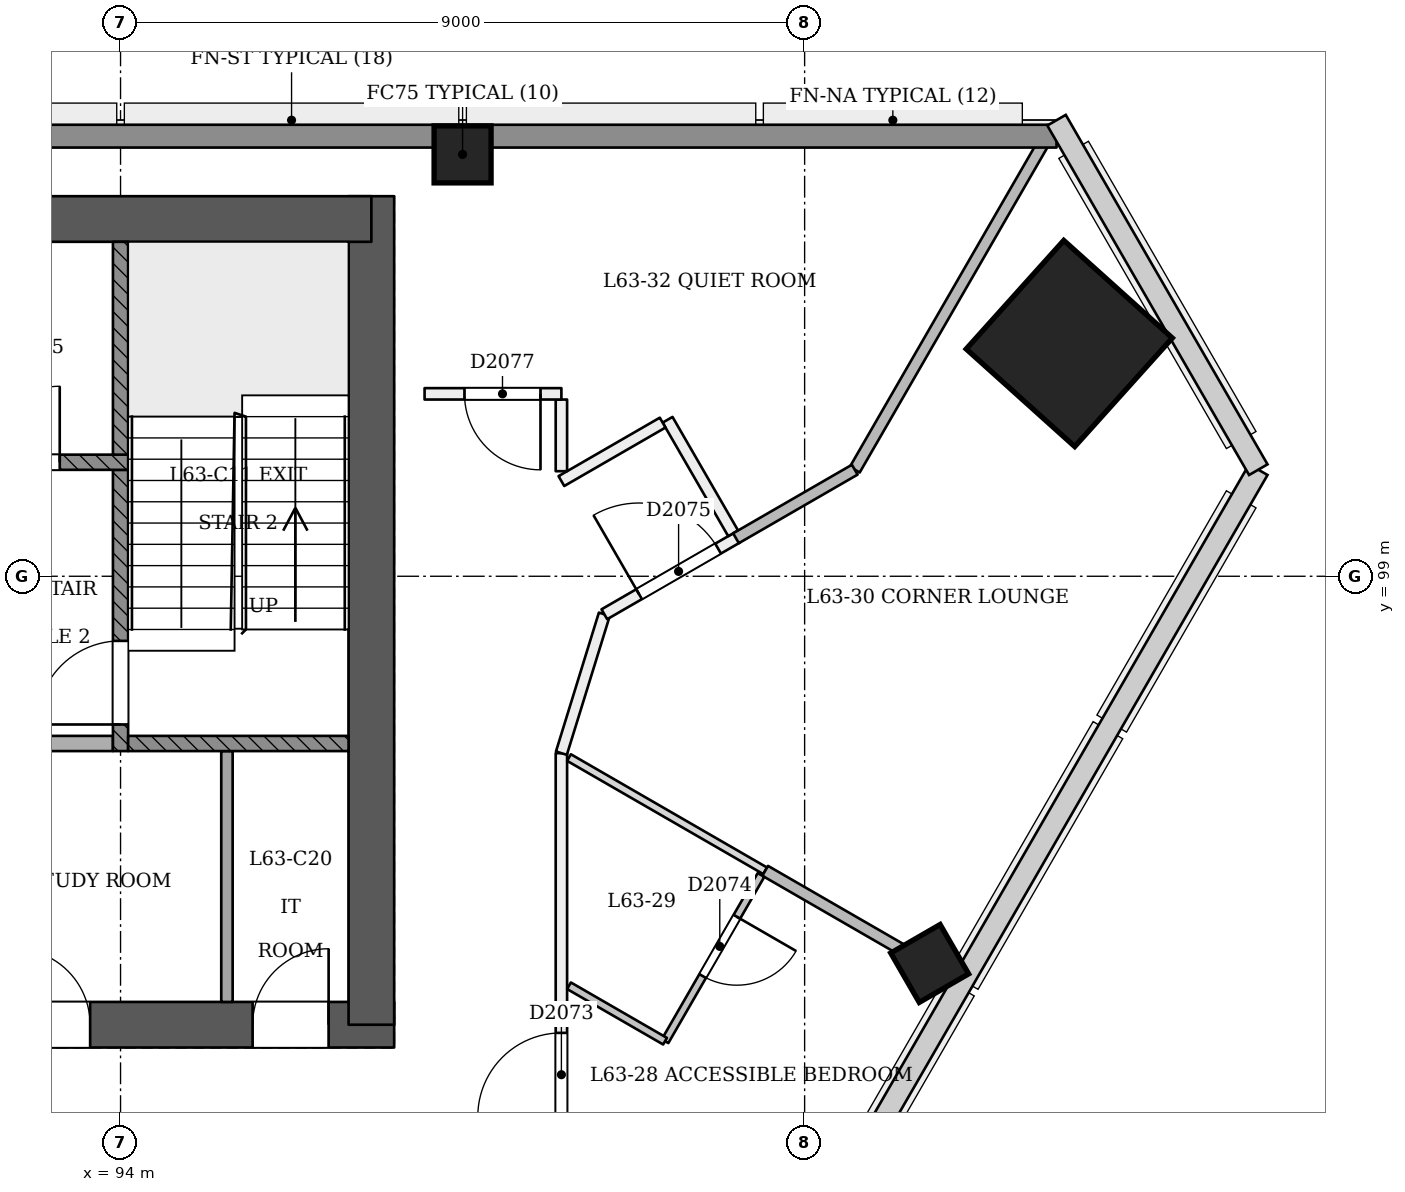
"""IFC4 building model, lengths in metres.
Left out: names, types, materials, properties, quantities, classifications, styles, units other than length and angle.
Written with IfcOpenShell. Run it as: python <this file> out.ifc"""

import sys

from ifc_helpers import new_model, si_unit, direction, frame, frame_2d, origin, origin_2d, place, context, subcontext, project, spatial, rectangle, extrude, element, fill, save


model = new_model("IFC4")
c1 = context("Model", 3, precision=1e-05, world=origin(), true_north=direction((0.0, 1.0)))
c2 = subcontext(c1, "Body", "Model", "MODEL_VIEW")
j1 = project(units=[si_unit("LENGTHUNIT", "METRE"), si_unit("PLANEANGLEUNIT", "RADIAN")], contexts=[c1])
p1 = place(None, origin())
s1 = spatial("IfcSite", under=j1, at=p1, CompositionType="ELEMENT")
p2 = place(p1, origin())
s2 = spatial("IfcBuilding", under=s1, at=p2, CompositionType="ELEMENT")
p3 = place(p2, frame((0.0, 0.0, 246.4)))
s3 = spatial("IfcBuildingStorey", under=s2, at=p3, CompositionType="ELEMENT", Elevation=246.4)
p4 = place(p3, frame((72.7, 93.1, 0.0), z_axis=(0.0, 0.0, 1.0), x_axis=(1.0, 0.0, 0.0)))
e1 = element("IfcWall", 1, at=p4, inside=s3, PredefinedType="SHEAR", context=c2, shape_type="SweptSolid", body=[
    extrude(rectangle(XDim=24.9, YDim=0.6, at=frame_2d((12.45, 0.0))), origin(), (0.0, 0.0, 1.0), 3.6),
])
p5 = place(p4, frame((1.1, 0.0, 0.0)))
e2 = element("IfcOpeningElement", 2, at=p5, cuts=e1, PredefinedType="OPENING", context=c2, shape_type="SweptSolid", body=[
    extrude(rectangle(XDim=1.2, YDim=2.1, at=frame_2d((0.6, 1.05))), frame((0.0, 0.311, 0.0), z_axis=(0.0, -1.0, 0.0), x_axis=(1.0, 0.0, 0.0)), (0.0, 0.0, 1.0), 0.621),
])
p6 = place(p4, frame((3.3, 0.0, 0.0)))
e3 = element("IfcOpeningElement", 3, at=p6, cuts=e1, PredefinedType="OPENING", context=c2, shape_type="SweptSolid", body=[
    extrude(rectangle(XDim=1.2, YDim=2.1, at=frame_2d((0.6, 1.05))), frame((0.0, 0.311, 0.0), z_axis=(0.0, -1.0, 0.0), x_axis=(1.0, 0.0, 0.0)), (0.0, 0.0, 1.0), 0.621),
])
p7 = place(p4, frame((13.3, 0.0, 0.0)))
e4 = element("IfcOpeningElement", 4, at=p7, cuts=e1, PredefinedType="OPENING", context=c2, shape_type="SweptSolid", body=[
    extrude(rectangle(XDim=1.2, YDim=2.1, at=frame_2d((0.6, 1.05))), frame((0.0, 0.311, 0.0), z_axis=(0.0, -1.0, 0.0), x_axis=(1.0, 0.0, 0.0)), (0.0, 0.0, 1.0), 0.621),
])
p8 = place(p4, frame((16.012, 0.0, 0.0)))
e5 = element("IfcOpeningElement", 5, at=p8, cuts=e1, PredefinedType="OPENING", context=c2, shape_type="SweptSolid", body=[
    extrude(rectangle(XDim=1.0, YDim=2.1, at=frame_2d((0.5, 1.05))), frame((0.0, 0.311, 0.0), z_axis=(0.0, -1.0, 0.0), x_axis=(1.0, 0.0, 0.0)), (0.0, 0.0, 1.0), 0.621),
])
p9 = place(p4, frame((19.9, 0.0, 0.0)))
e6 = element("IfcOpeningElement", 6, at=p9, cuts=e1, PredefinedType="OPENING", context=c2, shape_type="SweptSolid", body=[
    extrude(rectangle(XDim=1.0, YDim=2.1, at=frame_2d((0.5, 1.05))), frame((0.0, 0.311, 0.0), z_axis=(0.0, -1.0, 0.0), x_axis=(1.0, 0.0, 0.0)), (0.0, 0.0, 1.0), 0.621),
])
p10 = place(p4, frame((23.038, 0.0, 0.0)))
e7 = element("IfcOpeningElement", 7, at=p10, cuts=e1, PredefinedType="OPENING", context=c2, shape_type="SweptSolid", body=[
    extrude(rectangle(XDim=1.0, YDim=2.1, at=frame_2d((0.5, 1.05))), frame((0.0, 0.311, 0.0), z_axis=(0.0, -1.0, 0.0), x_axis=(1.0, 0.0, 0.0)), (0.0, 0.0, 1.0), 0.621),
])
p11 = place(p3, frame((97.3, 93.1, 0.0), z_axis=(0.0, 0.0, 1.0), x_axis=(0.0, 1.0, 0.0)))
e8 = element("IfcWall", 8, at=p11, inside=s3, PredefinedType="SHEAR", context=c2, shape_type="SweptSolid", body=[
    extrude(rectangle(XDim=10.9, YDim=0.6, at=frame_2d((5.45, 0.0))), origin(), (0.0, 0.0, 1.0), 3.6),
])
p12 = place(p3, frame((97.3, 103.7, 0.0), z_axis=(0.0, 0.0, 1.0), x_axis=(-1.0, 0.0, 0.0)))
e9 = element("IfcWall", 9, at=p12, inside=s3, PredefinedType="SHEAR", context=c2, shape_type="SweptSolid", body=[
    extrude(rectangle(XDim=24.9, YDim=0.6, at=frame_2d((12.45, 0.0))), origin(), (0.0, 0.0, 1.0), 3.6),
])
p13 = place(p3, frame((106.516, 102.051, 0.0), z_axis=(-0.028401796786, 0.009286506348, 0.999553449666), x_axis=(0.498888848076, -0.866380961443, 0.022224916524)))
e10 = element("IfcColumn", 10, at=p13, inside=s3, PredefinedType="COLUMN", context=c2, shape_type="SweptSolid", body=[
    extrude(rectangle(XDim=1.92, YDim=1.92, at=origin_2d()), origin(), (0.0, 0.0, 1.0), 3.602),
])
p14 = place(p3, frame((98.5, 104.55, 0.0), z_axis=(0.0, 0.0, 1.0), x_axis=(1.0, 0.0, 0.0)))
e11 = element("IfcColumn", 11, at=p14, inside=s3, PredefinedType="COLUMN", context=c2, shape_type="SweptSolid", body=[
    extrude(rectangle(XDim=0.75, YDim=0.75, at=origin_2d()), origin(), (0.0, 0.0, 1.0), 3.6),
])
p15 = place(p3, frame((104.672, 93.859, -0.023), z_axis=(-0.02215369191, 0.038413282303, 0.999016333038), x_axis=(-0.500654738192, -0.865363068433, 0.022171894779)))
e12 = element("IfcColumn", 12, at=p15, inside=s3, PredefinedType="COLUMN", context=c2, shape_type="SweptSolid", body=[
    extrude(rectangle(XDim=0.75, YDim=0.75, at=origin_2d()), origin(), (0.0, 0.0, 1.0), 3.604),
])
p16 = place(p3, frame((99.8, 91.477, 0.0), z_axis=(0.0, 0.0, 1.0), x_axis=(0.0, 1.0, 0.0)))
e13 = element("IfcWall", 13, at=p16, inside=s3, PredefinedType="PARTITIONING", context=c2, shape_type="SweptSolid", body=[
    extrude(rectangle(XDim=5.196, YDim=0.15, at=frame_2d((2.598, 0.0))), origin(), (0.0, 0.0, 1.0), 3.2),
])
p17 = place(p16, frame((0.416, 0.0, 0.0)))
e14 = element("IfcOpeningElement", 14, at=p17, cuts=e13, PredefinedType="OPENING", context=c2, shape_type="SweptSolid", body=[
    extrude(rectangle(XDim=1.1, YDim=2.1, at=frame_2d((0.55, 1.05))), frame((0.0, 0.085, 0.0), z_axis=(0.0, -1.0, 0.0), x_axis=(1.0, 0.0, 0.0)), (0.0, 0.0, 1.0), 0.171),
])
p18 = place(p3, frame((99.8, 96.673, 0.0), z_axis=(0.0, 0.0, 1.0), x_axis=(0.29539525105, 0.955375133472, 0.0)))
e15 = element("IfcWall", 15, at=p18, inside=s3, PredefinedType="PARTITIONING", context=c2, shape_type="SweptSolid", body=[
    extrude(rectangle(XDim=1.913, YDim=0.15, at=frame_2d((0.956, 0.0))), origin(), (0.0, 0.0, 1.0), 3.2),
])
p19 = place(p3, frame((100.365, 98.5, 0.0), z_axis=(0.0, 0.0, 1.0), x_axis=(0.866010470582, 0.500025864173, 0.0)))
e16 = element("IfcWall", 16, at=p19, inside=s3, PredefinedType="PARTITIONING", context=c2, shape_type="SweptSolid", body=[
    extrude(rectangle(XDim=2.02, YDim=0.15, at=frame_2d((1.01, 0.0))), origin(), (0.0, 0.0, 1.0), 3.2),
])
p20 = place(p19, frame((0.528, 0.0, 0.0)))
e17 = element("IfcOpeningElement", 17, at=p20, cuts=e16, PredefinedType="OPENING", context=c2, shape_type="SweptSolid", body=[
    extrude(rectangle(XDim=1.2, YDim=2.1, at=frame_2d((0.6, 1.05))), frame((0.0, 0.085, 0.0), z_axis=(0.0, -1.0, 0.0), x_axis=(1.0, 0.0, 0.0)), (0.0, 0.0, 1.0), 0.171),
])
p21 = place(p3, frame((102.059, 99.565, 0.0), z_axis=(0.0, 0.0, 1.0), x_axis=(-0.499914405916, 0.866074815912, 0.0)))
e18 = element("IfcWall", 18, at=p21, inside=s3, PredefinedType="PARTITIONING", context=c2, shape_type="SweptSolid", body=[
    extrude(rectangle(XDim=1.725, YDim=0.15, at=frame_2d((0.862, 0.0))), origin(), (0.0, 0.0, 1.0), 3.2),
])
p22 = place(p3, frame((101.132, 101.021, 0.0), z_axis=(0.0, 0.0, 1.0), x_axis=(-0.866026989333, -0.499997253739, 0.0)))
e19 = element("IfcWall", 19, at=p22, inside=s3, PredefinedType="PARTITIONING", context=c2, shape_type="SweptSolid", body=[
    extrude(rectangle(XDim=1.538, YDim=0.15, at=frame_2d((0.769, 0.0))), origin(), (0.0, 0.0, 1.0), 3.2),
])
p23 = place(p3, frame((99.8, 100.382, 0.0), z_axis=(0.0, 0.0, 1.0), x_axis=(0.0, 1.0, 0.0)))
e20 = element("IfcWall", 20, at=p23, inside=s3, PredefinedType="PARTITIONING", context=c2, shape_type="SweptSolid", body=[
    extrude(rectangle(XDim=0.943, YDim=0.15, at=frame_2d((0.471, 0.0))), origin(), (0.0, 0.0, 1.0), 3.2),
])
p24 = place(p3, frame((99.8, 101.4, 0.0), z_axis=(0.0, 0.0, 1.0), x_axis=(-1.0, 0.0, 0.0)))
e21 = element("IfcWall", 21, at=p24, inside=s3, PredefinedType="PARTITIONING", context=c2, shape_type="SweptSolid", body=[
    extrude(rectangle(XDim=1.8, YDim=0.15, at=frame_2d((0.9, 0.0))), origin(), (0.0, 0.0, 1.0), 3.2),
])
p25 = place(p24, frame((0.275, 0.0, 0.0)))
e22 = element("IfcOpeningElement", 22, at=p25, cuts=e21, PredefinedType="OPENING", context=c2, shape_type="SweptSolid", body=[
    extrude(rectangle(XDim=1.0, YDim=2.1, at=frame_2d((0.5, 1.05))), frame((0.0, 0.085, 0.0), z_axis=(0.0, -1.0, 0.0), x_axis=(1.0, 0.0, 0.0)), (0.0, 0.0, 1.0), 0.171),
])
p26 = place(p3, frame((102.426, 95.07, 0.0), z_axis=(0.0, 0.0, 1.0), x_axis=(-0.499976333282, -0.866039067339, 0.0)))
e23 = element("IfcWall", 23, at=p26, inside=s3, PredefinedType="PARTITIONING", context=c2, shape_type="SweptSolid", body=[
    extrude(rectangle(XDim=2.525, YDim=0.1, at=frame_2d((1.262, 0.0))), origin(), (0.0, 0.0, 1.0), 3.2),
])
p27 = place(p26, frame((0.635, 0.0, 0.0)))
e24 = element("IfcOpeningElement", 24, at=p27, cuts=e23, PredefinedType="OPENING", context=c2, shape_type="SweptSolid", body=[
    extrude(rectangle(XDim=0.9, YDim=2.1, at=frame_2d((0.45, 1.05))), frame((0.0, 0.061, 0.0), z_axis=(0.0, -1.0, 0.0), x_axis=(1.0, 0.0, 0.0)), (0.0, 0.0, 1.0), 0.121),
])
p28 = place(p3, frame((101.164, 92.883, 0.0), z_axis=(0.0, 0.0, 1.0), x_axis=(-0.866051847062, 0.499954196102, 0.0)))
e25 = element("IfcWall", 25, at=p28, inside=s3, PredefinedType="PARTITIONING", context=c2, shape_type="SweptSolid", body=[
    extrude(rectangle(XDim=1.459, YDim=0.1, at=frame_2d((0.729, 0.0))), origin(), (0.0, 0.0, 1.0), 3.2),
])
p29 = place(p3, frame((104.975, 93.685, 0.0), z_axis=(0.0, 0.0, 1.0), x_axis=(-0.866033125095, 0.499986626058, 0.0)))
e26 = element("IfcWall", 26, at=p29, inside=s3, PredefinedType="PARTITIONING", context=c2, shape_type="SweptSolid", body=[
    extrude(rectangle(XDim=2.88, YDim=0.15, at=frame_2d((1.44, 0.0))), origin(), (0.0, 0.0, 1.0), 2.7),
])
p30 = place(p3, frame((102.481, 95.125, 0.0), z_axis=(0.0, 0.0, 1.0), x_axis=(-0.866051901885, 0.499954101135, 0.0)))
e27 = element("IfcWall", 27, at=p30, inside=s3, PredefinedType="PARTITIONING", context=c2, shape_type="SweptSolid", body=[
    extrude(rectangle(XDim=2.98, YDim=0.1, at=frame_2d((1.49, 0.0))), origin(), (0.0, 0.0, 1.0), 3.2),
])
p31 = place(p3, frame((106.256, 104.9, 0.0), z_axis=(0.0, 0.0, 1.0), x_axis=(-0.499981525251, -0.866036069923, 0.0)))
e28 = element("IfcWall", 28, at=p31, inside=s3, PredefinedType="PARTITIONING", context=c2, shape_type="SweptSolid", body=[
    extrude(rectangle(XDim=5.194, YDim=0.15, at=frame_2d((2.597, 0.0))), origin(), (0.0, 0.0, 1.0), 2.7),
])
p32 = place(p3, frame((103.66, 100.402, 0.0), z_axis=(0.0, 0.0, 1.0), x_axis=(-0.866061671171, -0.499937177781, 0.0)))
e29 = element("IfcWall", 29, at=p32, inside=s3, PredefinedType="PARTITIONING", context=c2, shape_type="SweptSolid", body=[
    extrude(rectangle(XDim=1.804, YDim=0.15, at=frame_2d((0.902, 0.0))), origin(), (0.0, 0.0, 1.0), 3.2),
])
p33 = place(p3, frame((63.686, 104.79, 0.0), z_axis=(0.0, 0.0, 1.0), x_axis=(1.0, 0.0, 0.0)))
e30 = element("IfcWall", 30, at=p33, inside=s3, PredefinedType="SOLIDWALL", context=c2, shape_type="SweptSolid", body=[
    extrude(rectangle(XDim=42.628, YDim=0.3, at=frame_2d((21.314, 0.0))), origin(), (0.0, 0.0, 1.0), 2.7),
])
p34 = place(p3, frame((95.4, 93.4, 0.0), z_axis=(0.0, 0.0, 1.0), x_axis=(0.0, 1.0, 0.0)))
e31 = element("IfcWall", 31, at=p34, inside=s3, PredefinedType="PARTITIONING", context=c2, shape_type="SweptSolid", body=[
    extrude(rectangle(XDim=3.3, YDim=0.15, at=frame_2d((1.65, 0.0))), origin(), (0.0, 0.0, 1.0), 3.2),
])
p35 = place(p3, frame((91.5, 96.8, 0.0), z_axis=(0.0, 0.0, 1.0), x_axis=(1.0, 0.0, 0.0)))
e32 = element("IfcWall", 32, at=p35, inside=s3, PredefinedType="PARTITIONING", context=c2, shape_type="SweptSolid", body=[
    extrude(rectangle(XDim=2.4, YDim=0.2, at=frame_2d((1.2, 0.0))), origin(), (0.0, 0.0, 1.0), 3.2),
])
p36 = place(p3, frame((94.0, 96.7, 0.0), z_axis=(0.0, 0.0, 1.0), x_axis=(0.0, 1.0, 0.0)))
e33 = element("IfcWall", 33, at=p36, inside=s3, PredefinedType="SOLIDWALL", context=c2, shape_type="SweptSolid", body=[
    extrude(rectangle(XDim=3.7, YDim=0.2, at=frame_2d((1.85, 0.0))), origin(), (0.0, 0.0, 1.0), 3.2),
])
p37 = place(p36, frame((0.35, 0.0, 0.0)))
e34 = element("IfcOpeningElement", 34, at=p37, cuts=e33, PredefinedType="OPENING", context=c2, shape_type="SweptSolid", body=[
    extrude(rectangle(XDim=1.1, YDim=2.1, at=frame_2d((0.55, 1.05))), frame((0.0, 0.11, 0.0), z_axis=(0.0, -1.0, 0.0), x_axis=(1.0, 0.0, 0.0)), (0.0, 0.0, 1.0), 0.221),
])
p38 = place(p3, frame((94.1, 96.8, 0.0), z_axis=(0.0, 0.0, 1.0), x_axis=(1.0, 0.0, 0.0)))
e35 = element("IfcWall", 35, at=p38, inside=s3, PredefinedType="SOLIDWALL", context=c2, shape_type="SweptSolid", body=[
    extrude(rectangle(XDim=2.9, YDim=0.2, at=frame_2d((1.45, 0.0))), origin(), (0.0, 0.0, 1.0), 3.2),
])
p39 = place(p3, frame((75.9, 100.5, 0.0), z_axis=(0.0, 0.0, 1.0), x_axis=(1.0, 0.0, 0.0)))
e36 = element("IfcWall", 36, at=p39, inside=s3, PredefinedType="SOLIDWALL", context=c2, shape_type="SweptSolid", body=[
    extrude(rectangle(XDim=18.2, YDim=0.2, at=frame_2d((9.1, 0.0))), origin(), (0.0, 0.0, 1.0), 3.2),
])
p40 = place(p39, frame((2.6, 0.0, 0.0)))
e37 = element("IfcOpeningElement", 37, at=p40, cuts=e36, PredefinedType="OPENING", context=c2, shape_type="SweptSolid", body=[
    extrude(rectangle(XDim=1.1, YDim=2.1, at=frame_2d((0.55, 1.05))), frame((0.0, 0.11, 0.0), z_axis=(0.0, -1.0, 0.0), x_axis=(1.0, 0.0, 0.0)), (0.0, 0.0, 1.0), 0.221),
])
p41 = place(p39, frame((4.5, 0.0, 0.0)))
e38 = element("IfcOpeningElement", 38, at=p41, cuts=e36, PredefinedType="OPENING", context=c2, shape_type="SweptSolid", body=[
    extrude(rectangle(XDim=1.1, YDim=2.1, at=frame_2d((0.55, 1.05))), frame((0.0, 0.11, 0.0), z_axis=(0.0, -1.0, 0.0), x_axis=(1.0, 0.0, 0.0)), (0.0, 0.0, 1.0), 0.221),
])
p42 = place(p39, frame((6.4, 0.0, 0.0)))
e39 = element("IfcOpeningElement", 39, at=p42, cuts=e36, PredefinedType="OPENING", context=c2, shape_type="SweptSolid", body=[
    extrude(rectangle(XDim=1.1, YDim=2.1, at=frame_2d((0.55, 1.05))), frame((0.0, 0.11, 0.0), z_axis=(0.0, -1.0, 0.0), x_axis=(1.0, 0.0, 0.0)), (0.0, 0.0, 1.0), 0.221),
])
p43 = place(p39, frame((8.3, 0.0, 0.0)))
e40 = element("IfcOpeningElement", 40, at=p43, cuts=e36, PredefinedType="OPENING", context=c2, shape_type="SweptSolid", body=[
    extrude(rectangle(XDim=1.1, YDim=2.1, at=frame_2d((0.55, 1.05))), frame((0.0, 0.11, 0.0), z_axis=(0.0, -1.0, 0.0), x_axis=(1.0, 0.0, 0.0)), (0.0, 0.0, 1.0), 0.221),
])
p44 = place(p39, frame((10.2, 0.0, 0.0)))
e41 = element("IfcOpeningElement", 41, at=p44, cuts=e36, PredefinedType="OPENING", context=c2, shape_type="SweptSolid", body=[
    extrude(rectangle(XDim=1.1, YDim=2.1, at=frame_2d((0.55, 1.05))), frame((0.0, 0.11, 0.0), z_axis=(0.0, -1.0, 0.0), x_axis=(1.0, 0.0, 0.0)), (0.0, 0.0, 1.0), 0.221),
])
p45 = place(p39, frame((12.1, 0.0, 0.0)))
e42 = element("IfcOpeningElement", 42, at=p45, cuts=e36, PredefinedType="OPENING", context=c2, shape_type="SweptSolid", body=[
    extrude(rectangle(XDim=1.1, YDim=2.1, at=frame_2d((0.55, 1.05))), frame((0.0, 0.11, 0.0), z_axis=(0.0, -1.0, 0.0), x_axis=(1.0, 0.0, 0.0)), (0.0, 0.0, 1.0), 0.221),
])
p46 = place(p39, frame((14.0, 0.0, 0.0)))
e43 = element("IfcOpeningElement", 43, at=p46, cuts=e36, PredefinedType="OPENING", context=c2, shape_type="SweptSolid", body=[
    extrude(rectangle(XDim=1.1, YDim=2.1, at=frame_2d((0.55, 1.05))), frame((0.0, 0.11, 0.0), z_axis=(0.0, -1.0, 0.0), x_axis=(1.0, 0.0, 0.0)), (0.0, 0.0, 1.0), 0.221),
])
p47 = place(p39, frame((0.65, 0.0, 0.0)))
e44 = element("IfcOpeningElement", 44, at=p47, cuts=e36, PredefinedType="OPENING", context=c2, shape_type="SweptSolid", body=[
    extrude(rectangle(XDim=1.0, YDim=2.1, at=frame_2d((0.5, 1.05))), frame((0.0, 0.11, 0.0), z_axis=(0.0, -1.0, 0.0), x_axis=(1.0, 0.0, 0.0)), (0.0, 0.0, 1.0), 0.221),
])
p48 = place(p39, frame((16.3, 0.0, 0.0)))
e45 = element("IfcOpeningElement", 45, at=p48, cuts=e36, PredefinedType="OPENING", context=c2, shape_type="SweptSolid", body=[
    extrude(rectangle(XDim=1.0, YDim=2.1, at=frame_2d((0.5, 1.05))), frame((0.0, 0.11, 0.0), z_axis=(0.0, -1.0, 0.0), x_axis=(1.0, 0.0, 0.0)), (0.0, 0.0, 1.0), 0.221),
])
p49 = place(p3, frame((94.0, 100.6, 0.0), z_axis=(0.0, 0.0, 1.0), x_axis=(0.0, 1.0, 0.0)))
e46 = element("IfcWall", 46, at=p49, inside=s3, PredefinedType="SOLIDWALL", context=c2, shape_type="SweptSolid", body=[
    extrude(rectangle(XDim=2.8, YDim=0.2, at=frame_2d((1.4, 0.0))), origin(), (0.0, 0.0, 1.0), 3.2),
])
p50 = place(p17, origin())
e47 = element("IfcDoor", 47, at=p50, inside=s3, OperationType="SINGLE_SWING_LEFT", PredefinedType="NOTDEFINED", context=c2, shape_type="SweptSolid", body=[
    extrude(rectangle(XDim=1.1, YDim=2.1, at=frame_2d((0.55, 1.05))), frame((0.0, 0.025, 0.0), z_axis=(0.0, -1.0, 0.0), x_axis=(1.0, 0.0, 0.0)), (0.0, 0.0, 1.0), 0.05),
])
fill(e14, e47)
p51 = place(p27, origin())
e48 = element("IfcDoor", 48, at=p51, inside=s3, OperationType="SINGLE_SWING_LEFT", PredefinedType="NOTDEFINED", context=c2, shape_type="SweptSolid", body=[
    extrude(rectangle(XDim=0.9, YDim=2.1, at=frame_2d((0.45, 1.05))), frame((0.0, 0.025, 0.0), z_axis=(0.0, -1.0, 0.0), x_axis=(1.0, 0.0, 0.0)), (0.0, 0.0, 1.0), 0.05),
])
fill(e24, e48)
p52 = place(p20, origin())
e49 = element("IfcDoor", 49, at=p52, inside=s3, OperationType="SINGLE_SWING_LEFT", PredefinedType="NOTDEFINED", context=c2, shape_type="SweptSolid", body=[
    extrude(rectangle(XDim=1.2, YDim=2.1, at=frame_2d((0.6, 1.05))), frame((0.0, 0.025, 0.0), z_axis=(0.0, -1.0, 0.0), x_axis=(1.0, 0.0, 0.0)), (0.0, 0.0, 1.0), 0.05),
])
fill(e17, e49)
p53 = place(p25, origin())
e50 = element("IfcDoor", 50, at=p53, inside=s3, OperationType="SINGLE_SWING_LEFT", PredefinedType="NOTDEFINED", context=c2, shape_type="SweptSolid", body=[
    extrude(rectangle(XDim=1.0, YDim=2.1, at=frame_2d((0.5, 1.05))), frame((0.0, 0.025, 0.0), z_axis=(0.0, -1.0, 0.0), x_axis=(1.0, 0.0, 0.0)), (0.0, 0.0, 1.0), 0.05),
])
fill(e22, e50)
p54 = place(p37, origin())
e51 = element("IfcDoor", 51, at=p54, inside=s3, OperationType="SINGLE_SWING_LEFT", PredefinedType="NOTDEFINED", context=c2, shape_type="SweptSolid", body=[
    extrude(rectangle(XDim=1.1, YDim=2.1, at=frame_2d((0.55, 1.05))), frame((0.0, 0.025, 0.0), z_axis=(0.0, -1.0, 0.0), x_axis=(1.0, 0.0, 0.0)), (0.0, 0.0, 1.0), 0.05),
])
fill(e34, e51)
p55 = place(p48, origin())
e52 = element("IfcDoor", 52, at=p55, inside=s3, OperationType="SINGLE_SWING_RIGHT", PredefinedType="NOTDEFINED", context=c2, shape_type="SweptSolid", body=[
    extrude(rectangle(XDim=1.0, YDim=2.1, at=frame_2d((0.5, 1.05))), frame((0.0, 0.025, 0.0), z_axis=(0.0, -1.0, 0.0), x_axis=(1.0, 0.0, 0.0)), (0.0, 0.0, 1.0), 0.05),
])
fill(e45, e52)
p56 = place(p9, origin())
e53 = element("IfcDoor", 53, at=p56, inside=s3, OperationType="SINGLE_SWING_LEFT", PredefinedType="NOTDEFINED", context=c2, shape_type="SweptSolid", body=[
    extrude(rectangle(XDim=1.0, YDim=2.1, at=frame_2d((0.5, 1.05))), frame((0.0, 0.025, 0.0), z_axis=(0.0, -1.0, 0.0), x_axis=(1.0, 0.0, 0.0)), (0.0, 0.0, 1.0), 0.05),
])
fill(e6, e53)
p57 = place(p10, origin())
e54 = element("IfcDoor", 54, at=p57, inside=s3, OperationType="SINGLE_SWING_RIGHT", PredefinedType="NOTDEFINED", context=c2, shape_type="SweptSolid", body=[
    extrude(rectangle(XDim=1.0, YDim=2.1, at=frame_2d((0.5, 1.05))), frame((0.0, 0.025, 0.0), z_axis=(0.0, -1.0, 0.0), x_axis=(1.0, 0.0, 0.0)), (0.0, 0.0, 1.0), 0.05),
])
fill(e7, e54)
save(model, sys.argv[1])
